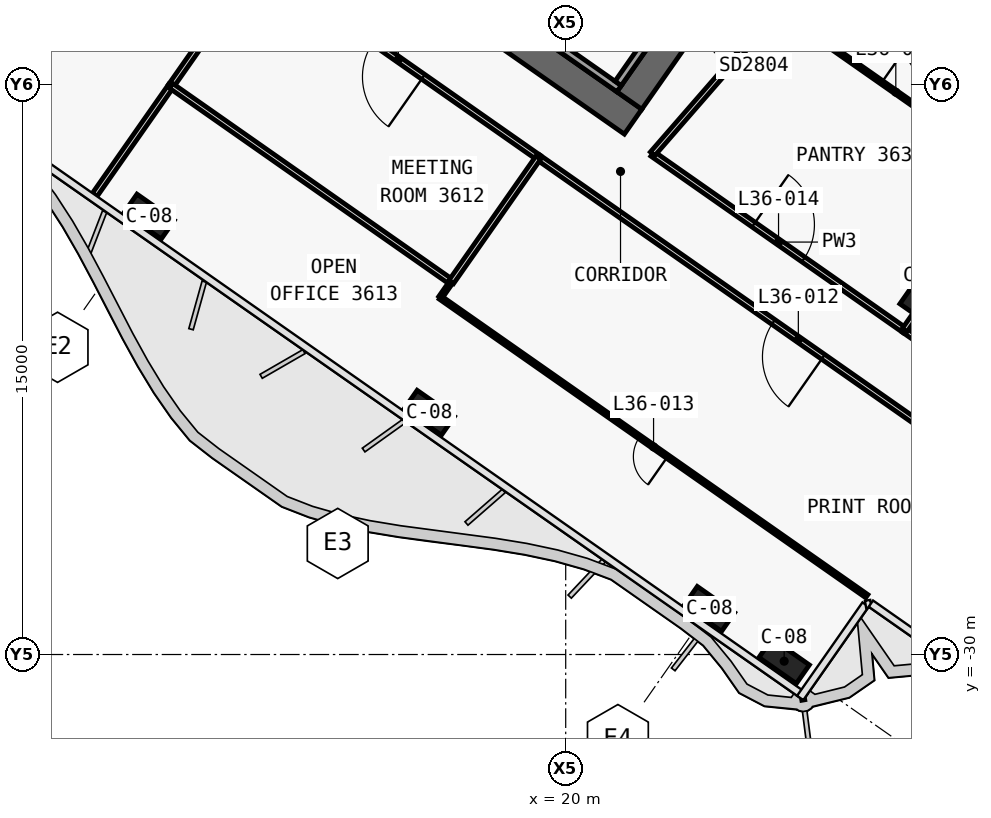
"""IFC4 building model, lengths in metres.
Left out: names, types, materials, properties, quantities, classifications, styles, units other than length and angle.
Written with IfcOpenShell. Run it as: python <this file> out.ifc"""

import sys

from ifc_helpers import new_model, si_unit, direction, frame, frame_2d, origin, origin_2d, place, context, subcontext, project, spatial, polyline, rectangle, outline, extrude, element, fill, save


model = new_model("IFC4")
c1 = context("Model", 3, precision=1e-05, world=origin(), true_north=direction((0.0, 1.0)))
c2 = subcontext(c1, "Body", "Model", "MODEL_VIEW")
j1 = project(units=[si_unit("LENGTHUNIT", "METRE"), si_unit("PLANEANGLEUNIT", "RADIAN")], contexts=[c1])
p1 = place(None, origin())
s1 = spatial("IfcSite", under=j1, at=p1, CompositionType="ELEMENT")
p2 = place(p1, origin())
s2 = spatial("IfcBuilding", under=s1, at=p2, CompositionType="ELEMENT")
p3 = place(p2, frame((0.0, 0.0, 159.3)))
s3 = spatial("IfcBuildingStorey", under=s2, at=p3, CompositionType="ELEMENT", Elevation=159.3)
p4 = place(p3, frame((-0.029, -0.712, 0.0), z_axis=(0.0, 0.0, 1.0), x_axis=(0.819151758019, -0.573576845187, 0.0)))
e1 = element("IfcWall", 1, at=p4, inside=s3, PredefinedType="SHEAR", context=c2, shape_type="SweptSolid", body=[
    extrude(outline(polyline([(26.616, 0.4), (-0.0, 0.4), (0.56, -0.4), (26.616, -0.4), (26.616, 0.4)])), origin(), (0.0, 0.0, 1.0), 3.9),
])
p5 = place(p4, frame((0.966, 0.0, 0.0)))
e2 = element("IfcOpeningElement", 2, at=p5, cuts=e1, PredefinedType="OPENING", context=c2, shape_type="SweptSolid", body=[
    extrude(rectangle(XDim=1.5, YDim=2.1, at=frame_2d((0.75, 1.05))), frame((0.0, 0.41, 0.0), z_axis=(0.0, -1.0, 0.0), x_axis=(1.0, 0.0, 0.0)), (0.0, 0.0, 1.0), 0.82),
])
p6 = place(p4, frame((12.366, 0.0, 0.0)))
e3 = element("IfcOpeningElement", 3, at=p6, cuts=e1, PredefinedType="OPENING", context=c2, shape_type="SweptSolid", body=[
    extrude(rectangle(XDim=1.5, YDim=2.1, at=frame_2d((0.75, 1.05))), frame((0.0, 0.41, 0.0), z_axis=(0.0, -1.0, 0.0), x_axis=(1.0, 0.0, 0.0)), (0.0, 0.0, 1.0), 0.82),
])
p7 = place(p3, frame((21.675, -15.421, 0.0), z_axis=(0.0, 0.0, 1.0), x_axis=(0.573581815061, 0.819148278049, 0.0)))
e4 = element("IfcWall", 4, at=p7, inside=s3, PredefinedType="SHEAR", context=c2, shape_type="SweptSolid", body=[
    extrude(outline(polyline([(9.6, 0.4), (0.0, 0.4), (0.0, -0.4), (9.6, -0.4), (9.6, 0.4)])), origin(), (0.0, 0.0, 1.0), 3.9),
])
p8 = place(p7, frame((6.3, 0.0, 0.0)))
e5 = element("IfcOpeningElement", 5, at=p8, cuts=e4, PredefinedType="OPENING", context=c2, shape_type="SweptSolid", body=[
    extrude(rectangle(XDim=1.8, YDim=2.1, at=frame_2d((0.9, 1.05))), frame((0.0, 0.41, 0.0), z_axis=(0.0, -1.0, 0.0), x_axis=(1.0, 0.0, 0.0)), (0.0, 0.0, 1.0), 0.82),
])
p9 = place(p7, frame((2.1, 0.0, 0.0)))
e6 = element("IfcOpeningElement", 6, at=p9, cuts=e4, PredefinedType="OPENING", context=c2, shape_type="SweptSolid", body=[
    extrude(rectangle(XDim=1.8, YDim=2.1, at=frame_2d((0.9, 1.05))), frame((0.0, 0.41, 0.0), z_axis=(0.0, -1.0, 0.0), x_axis=(1.0, 0.0, 0.0)), (0.0, 0.0, 1.0), 0.82),
])
for number, where, z_axis, x_axis in (
    (7, (9.038, -18.475, 0.0), (0.0, 0.0, 1.0), (0.819, -0.574, 0.0)),
    (8, (16.41, -23.637, 0.0), (0.0, 0.0, 1.0), (0.819, -0.574, 0.0)),
    (9, (23.782, -28.799, 0.0), (0.0, 0.0, 1.0), (0.819, -0.574, 0.0)),
    (10, (25.748, -30.176, 0.0), (0.0, 0.0, 1.0), (0.819, -0.574, 0.0)),
):
    element("IfcColumn", number, at=place(p3, frame(where, z_axis=z_axis, x_axis=x_axis)), inside=s3, PredefinedType="COLUMN", context=c2, shape_type="SweptSolid", body=[
        extrude(rectangle(XDim=1.2, YDim=0.6, at=origin_2d()), origin(), (0.0, 0.0, 1.0), 3.9),
    ])
p10 = place(p3, frame((29.49, -20.649, 0.0), z_axis=(0.0, 0.0, 1.0), x_axis=(0.819152044289, -0.573576436351, 0.0)))
e11 = element("IfcColumn", 11, at=p10, inside=s3, PredefinedType="COLUMN", context=c2, shape_type="SweptSolid", body=[
    extrude(rectangle(XDim=1.0, YDim=1.0, at=origin_2d()), origin(), (0.0, 0.0, 1.0), 3.9),
])
p11 = place(p3, frame((14.851, -10.521, 0.0), z_axis=(0.0, 0.0, 1.0), x_axis=(0.819141584393, -0.57359137434, 0.0)))
e12 = element("IfcWall", 12, at=p11, inside=s3, PredefinedType="SOLIDWALL", context=c2, shape_type="SweptSolid", body=[
    extrude(rectangle(XDim=8.0, YDim=0.2, at=frame_2d((4.0, 0.0))), origin(), (0.0, 0.0, 1.0), 3.62),
])
p12 = place(p3, frame((21.38, -14.97, 0.0), z_axis=(0.0, 0.0, 1.0), x_axis=(0.573559770908, 0.819163713305, 0.0)))
e13 = element("IfcWall", 13, at=p12, inside=s3, PredefinedType="SOLIDWALL", context=c2, shape_type="SweptSolid", body=[
    extrude(rectangle(XDim=1.85, YDim=0.2, at=frame_2d((0.925, 0.0))), origin(), (0.0, 0.0, 1.0), 3.62),
])
p13 = place(p3, frame((22.283, -16.824, 0.0), z_axis=(0.0, 0.0, 1.0), x_axis=(0.819158271121, -0.57356754341, 0.0)))
e14 = element("IfcWall", 14, at=p13, inside=s3, PredefinedType="PARTITIONING", context=c2, shape_type="SweptSolid", body=[
    extrude(rectangle(XDim=8.099, YDim=0.15, at=frame_2d((4.049, 0.0))), origin(), (0.0, 0.0, 1.0), 3.0),
])
p14 = place(p13, frame((3.25, 0.0, 0.0)))
e15 = element("IfcOpeningElement", 15, at=p14, cuts=e14, PredefinedType="OPENING", context=c2, shape_type="SweptSolid", body=[
    extrude(rectangle(XDim=1.6, YDim=2.1, at=frame_2d((0.8, 1.05))), frame((0.0, 0.085, 0.0), z_axis=(0.0, -1.0, 0.0), x_axis=(1.0, 0.0, 0.0)), (0.0, 0.0, 1.0), 0.17),
])
p15 = place(p3, frame((28.914, -21.467, 0.0), z_axis=(0.0, 0.0, 1.0), x_axis=(0.819142757108, -0.573589699592, 0.0)))
e16 = element("IfcWall", 16, at=p15, inside=s3, PredefinedType="PARTITIONING", context=c2, shape_type="SweptSolid", body=[
    extrude(rectangle(XDim=5.532, YDim=0.15, at=frame_2d((2.766, 0.0))), origin(), (0.0, 0.0, 1.0), 3.0),
])
p16 = place(p15, frame((1.966, 0.0, 0.0)))
e17 = element("IfcOpeningElement", 17, at=p16, cuts=e16, PredefinedType="OPENING", context=c2, shape_type="SweptSolid", body=[
    extrude(rectangle(XDim=1.6, YDim=2.1, at=frame_2d((0.8, 1.05))), frame((0.0, 0.085, 0.0), z_axis=(0.0, -1.0, 0.0), x_axis=(1.0, 0.0, 0.0)), (0.0, 0.0, 1.0), 0.17),
])
p17 = place(p3, frame((19.284, -16.921, 0.0), z_axis=(0.0, 0.0, 1.0), x_axis=(-0.819155480642, 0.5735715287, 0.0)))
e18 = element("IfcWall", 18, at=p17, inside=s3, PredefinedType="PARTITIONING", context=c2, shape_type="SweptSolid", body=[
    extrude(rectangle(XDim=9.004, YDim=0.15, at=frame_2d((4.502, 0.0))), origin(), (0.0, 0.0, 1.0), 3.0),
])
p18 = place(p17, frame((3.702, 0.0, 0.0)))
e19 = element("IfcOpeningElement", 19, at=p18, cuts=e18, PredefinedType="OPENING", context=c2, shape_type="SweptSolid", body=[
    extrude(rectangle(XDim=1.6, YDim=2.1, at=frame_2d((0.8, 1.05))), frame((0.0, 0.085, 0.0), z_axis=(0.0, -1.0, 0.0), x_axis=(1.0, 0.0, 0.0)), (0.0, 0.0, 1.0), 0.17),
])
p19 = place(p3, frame((32.962, -26.499, 0.0), z_axis=(0.0, 0.0, 1.0), x_axis=(-0.819151565135, 0.573577120654, 0.0)))
e20 = element("IfcWall", 20, at=p19, inside=s3, PredefinedType="PARTITIONING", context=c2, shape_type="SweptSolid", body=[
    extrude(rectangle(XDim=16.702, YDim=0.15, at=frame_2d((8.351, 0.0))), origin(), (0.0, 0.0, 1.0), 2.9),
])
p20 = place(p19, frame((7.551, 0.0, 0.0)))
e21 = element("IfcOpeningElement", 21, at=p20, cuts=e20, PredefinedType="OPENING", context=c2, shape_type="SweptSolid", body=[
    extrude(rectangle(XDim=1.6, YDim=2.1, at=frame_2d((0.8, 1.05))), frame((0.0, 0.085, 0.0), z_axis=(0.0, -1.0, 0.0), x_axis=(1.0, 0.0, 0.0)), (0.0, 0.0, 1.0), 0.17),
])
p21 = place(p3, frame((25.588, -13.032, 0.0), z_axis=(0.0, 0.0, 1.0), x_axis=(0.819151551875, -0.57357713959, 0.0)))
e22 = element("IfcWall", 22, at=p21, inside=s3, PredefinedType="PARTITIONING", context=c2, shape_type="SweptSolid", body=[
    extrude(rectangle(XDim=7.564, YDim=0.1, at=frame_2d((3.782, 0.0))), origin(), (0.0, 0.0, 1.0), 3.0),
])
p22 = place(p21, frame((3.332, 0.0, 0.0)))
e23 = element("IfcOpeningElement", 23, at=p22, cuts=e22, PredefinedType="OPENING", context=c2, shape_type="SweptSolid", body=[
    extrude(rectangle(XDim=0.9, YDim=2.1, at=frame_2d((0.45, 1.05))), frame((0.0, 0.06, 0.0), z_axis=(0.0, -1.0, 0.0), x_axis=(1.0, 0.0, 0.0)), (0.0, 0.0, 1.0), 0.12),
])
p23 = place(p3, frame((29.191, -21.075, 0.0), z_axis=(0.0, 0.0, 1.0), x_axis=(-0.57322336738, -0.819399152483, 0.0)))
e24 = element("IfcWall", 24, at=p23, inside=s3, PredefinedType="PARTITIONING", context=c2, shape_type="SweptSolid", body=[
    extrude(rectangle(XDim=0.48, YDim=0.15, at=frame_2d((0.24, 0.0))), origin(), (0.0, 0.0, 1.0), 3.0),
])
p24 = place(p3, frame((22.285, -16.825, 0.0), z_axis=(0.0, 0.0, 1.0), x_axis=(0.656777182061, 0.754084698906, 0.0)))
e25 = element("IfcWall", 25, at=p24, inside=s3, PredefinedType="PARTITIONING", context=c2, shape_type="SweptSolid", body=[
    extrude(rectangle(XDim=5.028, YDim=0.15, at=frame_2d((2.514, 0.0))), origin(), (0.0, 0.0, 1.0), 3.0),
])
p25 = place(p3, frame((11.91, -11.758, 0.0), z_axis=(0.0, 0.0, 1.0), x_axis=(-0.573560601885, -0.819163131473, 0.0)))
e26 = element("IfcWall", 26, at=p25, inside=s3, PredefinedType="PARTITIONING", context=c2, shape_type="SweptSolid", body=[
    extrude(rectangle(XDim=4.002, YDim=0.15, at=frame_2d((2.001, 0.0))), origin(), (0.0, 0.0, 1.0), 3.62),
])
p26 = place(p3, frame((9.616, -15.033, 0.0), z_axis=(0.0, 0.0, 1.0), x_axis=(-0.573560622794, -0.819163116834, 0.0)))
e27 = element("IfcWall", 27, at=p26, inside=s3, PredefinedType="PARTITIONING", context=c2, shape_type="SweptSolid", body=[
    extrude(rectangle(XDim=3.501, YDim=0.15, at=frame_2d((1.75, 0.0))), origin(), (0.0, 0.0, 1.0), 2.9),
])
p27 = place(p3, frame((16.988, -20.196, 0.0), z_axis=(0.0, 0.0, 1.0), x_axis=(-0.819154173185, 0.573573395961, 0.0)))
e28 = element("IfcWall", 28, at=p27, inside=s3, PredefinedType="PARTITIONING", context=c2, shape_type="SweptSolid", body=[
    extrude(rectangle(XDim=9.0, YDim=0.15, at=frame_2d((4.5, 0.0))), origin(), (0.0, 0.0, 1.0), 3.0),
])
p28 = place(p3, frame((19.282, -16.92, 0.0), z_axis=(0.0, 0.0, 1.0), x_axis=(-0.573626190743, -0.819117203636, 0.0)))
e29 = element("IfcWall", 29, at=p28, inside=s3, PredefinedType="PARTITIONING", context=c2, shape_type="SweptSolid", body=[
    extrude(rectangle(XDim=4.0, YDim=0.15, at=frame_2d((2.0, 0.0))), origin(), (0.0, 0.0, 1.0), 3.62),
])
p29 = place(p3, frame((16.701, -20.607, 0.0), z_axis=(0.0, 0.0, 1.0), x_axis=(0.573822822947, 0.818979467304, 0.0)))
e30 = element("IfcWall", 30, at=p29, inside=s3, PredefinedType="PARTITIONING", context=c2, shape_type="SweptSolid", body=[
    extrude(rectangle(XDim=0.5, YDim=0.1, at=frame_2d((0.25, 0.0))), origin(), (0.0, 0.0, 1.0), 3.62),
])
p30 = place(p3, frame((27.923, -28.465, 0.0), z_axis=(0.0, 0.0, 1.0), x_axis=(-0.81914735472, 0.573583133691, 0.0)))
e31 = element("IfcWall", 31, at=p30, inside=s3, PredefinedType="PARTITIONING", context=c2, shape_type="SweptSolid", body=[
    extrude(rectangle(XDim=13.7, YDim=0.1, at=frame_2d((6.85, 0.0))), origin(), (0.0, 0.0, 1.0), 3.0),
])
p31 = place(p30, frame((6.4, 0.0, 0.0)))
e32 = element("IfcOpeningElement", 32, at=p31, cuts=e31, PredefinedType="OPENING", context=c2, shape_type="SweptSolid", body=[
    extrude(rectangle(XDim=0.9, YDim=2.1, at=frame_2d((0.45, 1.05))), frame((0.0, 0.06, 0.0), z_axis=(0.0, -1.0, 0.0), x_axis=(1.0, 0.0, 0.0)), (0.0, 0.0, 1.0), 0.12),
])
p32 = place(p18, origin())
e33 = element("IfcDoor", 33, at=p32, inside=s3, OperationType="DOUBLE_DOOR_SINGLE_SWING", PredefinedType="DOOR", context=c2, shape_type="SweptSolid", body=[
    extrude(rectangle(XDim=1.6, YDim=2.1, at=frame_2d((0.8, 1.05))), frame((0.0, 0.025, 0.0), z_axis=(0.0, -1.0, 0.0), x_axis=(1.0, 0.0, 0.0)), (0.0, 0.0, 1.0), 0.05),
])
fill(e19, e33)
p33 = place(p20, origin())
e34 = element("IfcDoor", 34, at=p33, inside=s3, OperationType="DOUBLE_DOOR_SINGLE_SWING", PredefinedType="DOOR", context=c2, shape_type="SweptSolid", body=[
    extrude(rectangle(XDim=1.6, YDim=2.1, at=frame_2d((0.8, 1.05))), frame((0.0, 0.025, 0.0), z_axis=(0.0, -1.0, 0.0), x_axis=(1.0, 0.0, 0.0)), (0.0, 0.0, 1.0), 0.05),
])
fill(e21, e34)
p34 = place(p31, origin())
e35 = element("IfcDoor", 35, at=p34, inside=s3, OperationType="SINGLE_SWING_RIGHT", PredefinedType="DOOR", context=c2, shape_type="SweptSolid", body=[
    extrude(rectangle(XDim=0.9, YDim=2.1, at=frame_2d((0.45, 1.05))), frame((0.0, 0.025, 0.0), z_axis=(0.0, -1.0, 0.0), x_axis=(1.0, 0.0, 0.0)), (0.0, 0.0, 1.0), 0.05),
])
fill(e32, e35)
p35 = place(p14, origin())
e36 = element("IfcDoor", 36, at=p35, inside=s3, OperationType="DOUBLE_DOOR_SINGLE_SWING", PredefinedType="DOOR", context=c2, shape_type="SweptSolid", body=[
    extrude(rectangle(XDim=1.6, YDim=2.1, at=frame_2d((0.8, 1.05))), frame((0.0, 0.025, 0.0), z_axis=(0.0, -1.0, 0.0), x_axis=(1.0, 0.0, 0.0)), (0.0, 0.0, 1.0), 0.05),
])
fill(e15, e36)
p36 = place(p22, origin())
e37 = element("IfcDoor", 37, at=p36, inside=s3, OperationType="SINGLE_SWING_LEFT", PredefinedType="DOOR", context=c2, shape_type="SweptSolid", body=[
    extrude(rectangle(XDim=0.9, YDim=2.1, at=frame_2d((0.45, 1.05))), frame((0.0, 0.025, 0.0), z_axis=(0.0, -1.0, 0.0), x_axis=(1.0, 0.0, 0.0)), (0.0, 0.0, 1.0), 0.05),
])
fill(e23, e37)
save(model, sys.argv[1])
